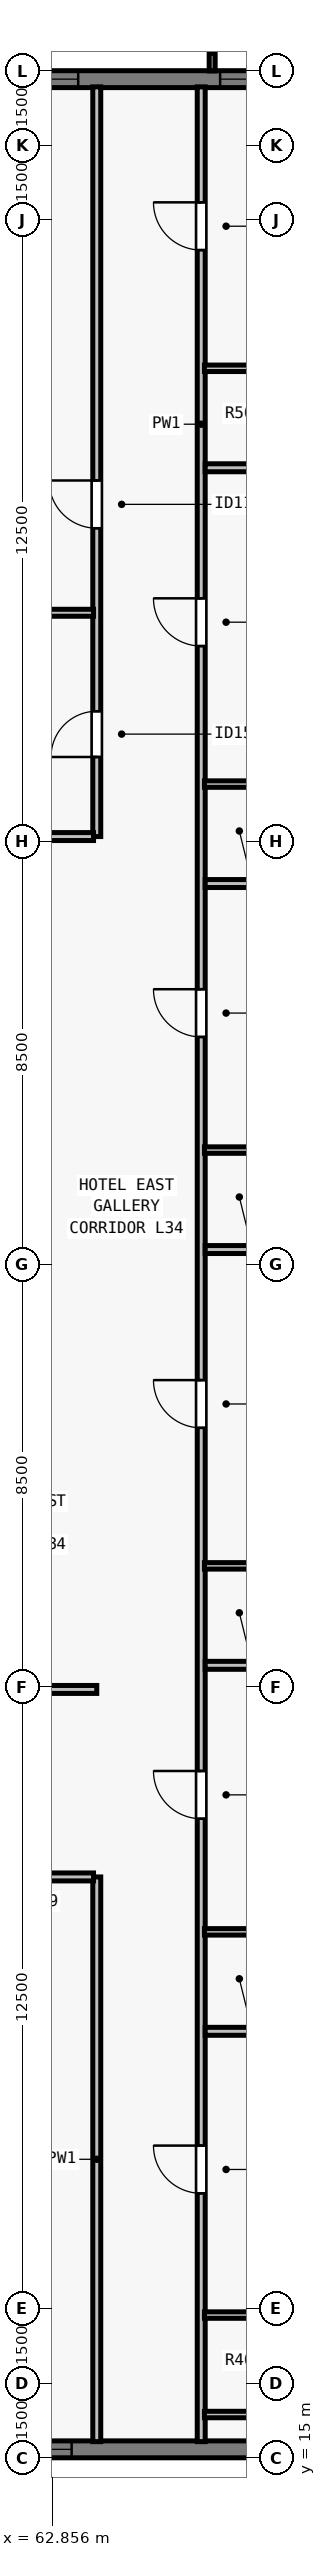
"""IFC4 building model, lengths in metres.
Left out: names, types, materials, properties, quantities, classifications, styles, units other than length and angle.
Written with IfcOpenShell. Run it as: python <this file> out.ifc"""

import sys

from ifc_helpers import new_model, si_unit, direction, frame, frame_2d, origin, place, context, subcontext, project, spatial, rectangle, extrude, element, fill, save


model = new_model("IFC4")
c1 = context("Model", 3, precision=1e-05, world=origin(), true_north=direction((0.0, 1.0)))
c2 = subcontext(c1, "Body", "Model", "MODEL_VIEW")
j1 = project(units=[si_unit("LENGTHUNIT", "METRE"), si_unit("PLANEANGLEUNIT", "RADIAN")], contexts=[c1])
p1 = place(None, origin())
s1 = spatial("IfcSite", under=j1, at=p1, CompositionType="ELEMENT")
p2 = place(p1, origin())
s2 = spatial("IfcBuilding", under=s1, at=p2, CompositionType="ELEMENT")
p3 = place(p2, frame((0.0, 0.0, 127.0)))
s3 = spatial("IfcBuildingStorey", under=s2, at=p3, CompositionType="ELEMENT", Elevation=127.0)
p4 = place(p3, frame((32.0, 62.83, 0.0), z_axis=(0.0, 0.0, 1.0), x_axis=(1.0, 0.0, 0.0)))
e1 = element("IfcWall", 1, at=p4, inside=s3, PredefinedType="SOLIDWALL", context=c2, shape_type="SweptSolid", body=[
    extrude(rectangle(XDim=39.682, YDim=0.34, at=frame_2d((19.841, 0.0))), origin(), (0.0, 0.0, 1.0), 3.28),
])
p5 = place(p4, frame((4.952, 0.0, 0.8)))
e2 = element("IfcOpeningElement", 2, at=p5, cuts=e1, PredefinedType="OPENING", context=c2, shape_type="SweptSolid", body=[
    extrude(rectangle(XDim=1.35, YDim=1.66, at=frame_2d((0.675, 0.83))), frame((0.0, 0.18, 0.0), z_axis=(0.0, -1.0, 0.0), x_axis=(1.0, 0.0, 0.0)), (0.0, 0.0, 1.0), 0.36),
])
p6 = place(p4, frame((12.059, 0.0, 0.8)))
e3 = element("IfcOpeningElement", 3, at=p6, cuts=e1, PredefinedType="OPENING", context=c2, shape_type="SweptSolid", body=[
    extrude(rectangle(XDim=1.35, YDim=1.66, at=frame_2d((0.675, 0.83))), frame((0.0, 0.18, 0.0), z_axis=(0.0, -1.0, 0.0), x_axis=(1.0, 0.0, 0.0)), (0.0, 0.0, 1.0), 0.36),
])
p7 = place(p4, frame((16.262, 0.0, 0.8)))
e4 = element("IfcOpeningElement", 4, at=p7, cuts=e1, PredefinedType="OPENING", context=c2, shape_type="SweptSolid", body=[
    extrude(rectangle(XDim=1.75, YDim=1.66, at=frame_2d((0.875, 0.83))), frame((0.0, 0.18, 0.0), z_axis=(0.0, -1.0, 0.0), x_axis=(1.0, 0.0, 0.0)), (0.0, 0.0, 1.0), 0.36),
])
p8 = place(p4, frame((19.166, 0.0, 0.8)))
e5 = element("IfcOpeningElement", 5, at=p8, cuts=e1, PredefinedType="OPENING", context=c2, shape_type="SweptSolid", body=[
    extrude(rectangle(XDim=1.35, YDim=1.66, at=frame_2d((0.675, 0.83))), frame((0.0, 0.18, 0.0), z_axis=(0.0, -1.0, 0.0), x_axis=(1.0, 0.0, 0.0)), (0.0, 0.0, 1.0), 0.36),
])
p9 = place(p4, frame((22.07, 0.0, 0.8)))
e6 = element("IfcOpeningElement", 6, at=p9, cuts=e1, PredefinedType="OPENING", context=c2, shape_type="SweptSolid", body=[
    extrude(rectangle(XDim=1.75, YDim=1.66, at=frame_2d((0.875, 0.83))), frame((0.0, 0.18, 0.0), z_axis=(0.0, -1.0, 0.0), x_axis=(1.0, 0.0, 0.0)), (0.0, 0.0, 1.0), 0.36),
])
p10 = place(p4, frame((26.273, 0.0, 0.8)))
e7 = element("IfcOpeningElement", 7, at=p10, cuts=e1, PredefinedType="OPENING", context=c2, shape_type="SweptSolid", body=[
    extrude(rectangle(XDim=1.35, YDim=1.66, at=frame_2d((0.675, 0.83))), frame((0.0, 0.18, 0.0), z_axis=(0.0, -1.0, 0.0), x_axis=(1.0, 0.0, 0.0)), (0.0, 0.0, 1.0), 0.36),
])
p11 = place(p4, frame((29.627, 0.0, 0.8)))
e8 = element("IfcOpeningElement", 8, at=p11, cuts=e1, PredefinedType="OPENING", context=c2, shape_type="SweptSolid", body=[
    extrude(rectangle(XDim=1.75, YDim=1.66, at=frame_2d((0.875, 0.83))), frame((0.0, 0.18, 0.0), z_axis=(0.0, -1.0, 0.0), x_axis=(1.0, 0.0, 0.0)), (0.0, 0.0, 1.0), 0.36),
])
p12 = place(p4, frame((34.23, 0.0, 0.8)))
e9 = element("IfcOpeningElement", 9, at=p12, cuts=e1, PredefinedType="OPENING", context=c2, shape_type="SweptSolid", body=[
    extrude(rectangle(XDim=1.35, YDim=1.66, at=frame_2d((0.675, 0.83))), frame((0.0, 0.18, 0.0), z_axis=(0.0, -1.0, 0.0), x_axis=(1.0, 0.0, 0.0)), (0.0, 0.0, 1.0), 0.36),
])
p13 = place(p3, frame((72.0, 15.17, 0.0), z_axis=(0.0, 0.0, 1.0), x_axis=(-1.0, 0.0, 0.0)))
e10 = element("IfcWall", 10, at=p13, inside=s3, PredefinedType="SOLIDWALL", context=c2, shape_type="SweptSolid", body=[
    extrude(rectangle(XDim=39.682, YDim=0.34, at=frame_2d((19.841, 0.0))), origin(), (0.0, 0.0, 1.0), 3.28),
])
p14 = place(p13, frame((8.755, 0.0, 0.8)))
e11 = element("IfcOpeningElement", 11, at=p14, cuts=e10, PredefinedType="OPENING", context=c2, shape_type="SweptSolid", body=[
    extrude(rectangle(XDim=1.75, YDim=1.66, at=frame_2d((0.875, 0.83))), frame((0.0, 0.18, 0.0), z_axis=(0.0, -1.0, 0.0), x_axis=(1.0, 0.0, 0.0)), (0.0, 0.0, 1.0), 0.36),
])
p15 = place(p13, frame((12.059, 0.0, 0.8)))
e12 = element("IfcOpeningElement", 12, at=p15, cuts=e10, PredefinedType="OPENING", context=c2, shape_type="SweptSolid", body=[
    extrude(rectangle(XDim=1.35, YDim=1.66, at=frame_2d((0.675, 0.83))), frame((0.0, 0.18, 0.0), z_axis=(0.0, -1.0, 0.0), x_axis=(1.0, 0.0, 0.0)), (0.0, 0.0, 1.0), 0.36),
])
p16 = place(p13, frame((16.262, 0.0, 0.8)))
e13 = element("IfcOpeningElement", 13, at=p16, cuts=e10, PredefinedType="OPENING", context=c2, shape_type="SweptSolid", body=[
    extrude(rectangle(XDim=1.75, YDim=1.66, at=frame_2d((0.875, 0.83))), frame((0.0, 0.18, 0.0), z_axis=(0.0, -1.0, 0.0), x_axis=(1.0, 0.0, 0.0)), (0.0, 0.0, 1.0), 0.36),
])
p17 = place(p13, frame((19.166, 0.0, 0.8)))
e14 = element("IfcOpeningElement", 14, at=p17, cuts=e10, PredefinedType="OPENING", context=c2, shape_type="SweptSolid", body=[
    extrude(rectangle(XDim=1.35, YDim=1.66, at=frame_2d((0.675, 0.83))), frame((0.0, 0.18, 0.0), z_axis=(0.0, -1.0, 0.0), x_axis=(1.0, 0.0, 0.0)), (0.0, 0.0, 1.0), 0.36),
])
p18 = place(p13, frame((21.27, 0.0, 0.8)))
e15 = element("IfcOpeningElement", 15, at=p18, cuts=e10, PredefinedType="OPENING", context=c2, shape_type="SweptSolid", body=[
    extrude(rectangle(XDim=1.75, YDim=1.66, at=frame_2d((0.875, 0.83))), frame((0.0, 0.18, 0.0), z_axis=(0.0, -1.0, 0.0), x_axis=(1.0, 0.0, 0.0)), (0.0, 0.0, 1.0), 0.36),
])
p19 = place(p13, frame((26.273, 0.0, 0.8)))
e16 = element("IfcOpeningElement", 16, at=p19, cuts=e10, PredefinedType="OPENING", context=c2, shape_type="SweptSolid", body=[
    extrude(rectangle(XDim=1.35, YDim=1.66, at=frame_2d((0.675, 0.83))), frame((0.0, 0.18, 0.0), z_axis=(0.0, -1.0, 0.0), x_axis=(1.0, 0.0, 0.0)), (0.0, 0.0, 1.0), 0.36),
])
p20 = place(p13, frame((28.377, 0.0, 0.8)))
e17 = element("IfcOpeningElement", 17, at=p20, cuts=e10, PredefinedType="OPENING", context=c2, shape_type="SweptSolid", body=[
    extrude(rectangle(XDim=1.75, YDim=1.66, at=frame_2d((0.875, 0.83))), frame((0.0, 0.18, 0.0), z_axis=(0.0, -1.0, 0.0), x_axis=(1.0, 0.0, 0.0)), (0.0, 0.0, 1.0), 0.36),
])
p21 = place(p13, frame((32.93, 0.0, 0.8)))
e18 = element("IfcOpeningElement", 18, at=p21, cuts=e10, PredefinedType="OPENING", context=c2, shape_type="SweptSolid", body=[
    extrude(rectangle(XDim=1.35, YDim=1.66, at=frame_2d((0.675, 0.83))), frame((0.0, 0.18, 0.0), z_axis=(0.0, -1.0, 0.0), x_axis=(1.0, 0.0, 0.0)), (0.0, 0.0, 1.0), 0.36),
])
p22 = place(p3, frame((65.85, 15.325, 0.0), z_axis=(0.0, 0.0, 1.0), x_axis=(0.0, 1.0, 0.0)))
e19 = element("IfcWall", 19, at=p22, inside=s3, PredefinedType="PARTITIONING", context=c2, shape_type="SweptSolid", body=[
    extrude(rectangle(XDim=47.35, YDim=0.16, at=frame_2d((23.675, 0.0))), origin(), (0.0, 0.0, 1.0), 2.555),
])
p23 = place(p22, frame((4.993, 0.0, 0.0)))
e20 = element("IfcOpeningElement", 20, at=p23, cuts=e19, PredefinedType="OPENING", context=c2, shape_type="SweptSolid", body=[
    extrude(rectangle(XDim=0.96, YDim=2.15, at=frame_2d((0.48, 1.075))), frame((0.0, 0.09, 0.0), z_axis=(0.0, -1.0, 0.0), x_axis=(1.0, 0.0, 0.0)), (0.0, 0.0, 1.0), 0.18),
])
p24 = place(p22, frame((12.525, 0.0, 0.0)))
e21 = element("IfcOpeningElement", 21, at=p24, cuts=e19, PredefinedType="OPENING", context=c2, shape_type="SweptSolid", body=[
    extrude(rectangle(XDim=0.96, YDim=2.15, at=frame_2d((0.48, 1.075))), frame((0.0, 0.09, 0.0), z_axis=(0.0, -1.0, 0.0), x_axis=(1.0, 0.0, 0.0)), (0.0, 0.0, 1.0), 0.18),
])
p25 = place(p22, frame((20.385, 0.0, 0.0)))
e22 = element("IfcOpeningElement", 22, at=p25, cuts=e19, PredefinedType="OPENING", context=c2, shape_type="SweptSolid", body=[
    extrude(rectangle(XDim=0.96, YDim=2.15, at=frame_2d((0.48, 1.075))), frame((0.0, 0.09, 0.0), z_axis=(0.0, -1.0, 0.0), x_axis=(1.0, 0.0, 0.0)), (0.0, 0.0, 1.0), 0.18),
])
p26 = place(p22, frame((28.246, 0.0, 0.0)))
e23 = element("IfcOpeningElement", 23, at=p26, cuts=e19, PredefinedType="OPENING", context=c2, shape_type="SweptSolid", body=[
    extrude(rectangle(XDim=0.96, YDim=2.15, at=frame_2d((0.48, 1.075))), frame((0.0, 0.09, 0.0), z_axis=(0.0, -1.0, 0.0), x_axis=(1.0, 0.0, 0.0)), (0.0, 0.0, 1.0), 0.18),
])
p27 = place(p22, frame((36.105, 0.0, 0.0)))
e24 = element("IfcOpeningElement", 24, at=p27, cuts=e19, PredefinedType="OPENING", context=c2, shape_type="SweptSolid", body=[
    extrude(rectangle(XDim=0.96, YDim=2.15, at=frame_2d((0.48, 1.075))), frame((0.0, 0.09, 0.0), z_axis=(0.0, -1.0, 0.0), x_axis=(1.0, 0.0, 0.0)), (0.0, 0.0, 1.0), 0.18),
])
p28 = place(p22, frame((44.068, 0.0, 0.0)))
e25 = element("IfcOpeningElement", 25, at=p28, cuts=e19, PredefinedType="OPENING", context=c2, shape_type="SweptSolid", body=[
    extrude(rectangle(XDim=0.96, YDim=2.15, at=frame_2d((0.48, 1.075))), frame((0.0, 0.09, 0.0), z_axis=(0.0, -1.0, 0.0), x_axis=(1.0, 0.0, 0.0)), (0.0, 0.0, 1.0), 0.18),
])
p29 = place(p3, frame((63.75, 15.325, 0.0), z_axis=(0.0, 0.0, 1.0), x_axis=(0.0, 1.0, 0.0)))
e26 = element("IfcWall", 26, at=p29, inside=s3, PredefinedType="PARTITIONING", context=c2, shape_type="SweptSolid", body=[
    extrude(rectangle(XDim=11.355, YDim=0.16, at=frame_2d((5.677, 0.0))), origin(), (0.0, 0.0, 1.0), 2.555),
])
p30 = place(p3, frame((63.75, 47.6, 0.0), z_axis=(0.0, 0.0, 1.0), x_axis=(0.0, 1.0, 0.0)))
e27 = element("IfcWall", 27, at=p30, inside=s3, PredefinedType="PARTITIONING", context=c2, shape_type="SweptSolid", body=[
    extrude(rectangle(XDim=15.075, YDim=0.16, at=frame_2d((7.538, 0.0))), origin(), (0.0, 0.0, 1.0), 2.555),
])
p31 = place(p30, frame((1.6, 0.0, 0.0)))
e28 = element("IfcOpeningElement", 28, at=p31, cuts=e27, PredefinedType="OPENING", context=c2, shape_type="SweptSolid", body=[
    extrude(rectangle(XDim=0.92, YDim=2.12, at=frame_2d((0.46, 1.06))), frame((0.0, 0.09, 0.0), z_axis=(0.0, -1.0, 0.0), x_axis=(1.0, 0.0, 0.0)), (0.0, 0.0, 1.0), 0.18),
])
p32 = place(p30, frame((6.2, 0.0, 0.0)))
e29 = element("IfcOpeningElement", 29, at=p32, cuts=e27, PredefinedType="OPENING", context=c2, shape_type="SweptSolid", body=[
    extrude(rectangle(XDim=0.96, YDim=2.12, at=frame_2d((0.48, 1.06))), frame((0.0, 0.09, 0.0), z_axis=(0.0, -1.0, 0.0), x_axis=(1.0, 0.0, 0.0)), (0.0, 0.0, 1.0), 0.18),
])
p33 = place(p3, frame((60.765, 30.45, 0.0), z_axis=(0.0, 0.0, 1.0), x_axis=(1.0, 0.0, 0.0)))
e30 = element("IfcWall", 30, at=p33, inside=s3, PredefinedType="PARTITIONING", context=c2, shape_type="SweptSolid", body=[
    extrude(rectangle(XDim=2.985, YDim=0.16, at=frame_2d((1.493, 0.0))), origin(), (0.0, 0.0, 1.0), 3.28),
])
p34 = place(p3, frame((60.765, 47.6, 0.0), z_axis=(0.0, 0.0, 1.0), x_axis=(1.0, 0.0, 0.0)))
e31 = element("IfcWall", 31, at=p34, inside=s3, PredefinedType="PARTITIONING", context=c2, shape_type="SweptSolid", body=[
    extrude(rectangle(XDim=2.92, YDim=0.16, at=frame_2d((1.46, 0.0))), origin(), (0.0, 0.0, 1.0), 3.28),
])
p35 = place(p3, frame((41.615, 26.68, 0.0), z_axis=(0.0, 0.0, 1.0), x_axis=(1.0, 0.0, 0.0)))
e32 = element("IfcWall", 32, at=p35, inside=s3, PredefinedType="PARTITIONING", context=c2, shape_type="SweptSolid", body=[
    extrude(rectangle(XDim=22.07, YDim=0.16, at=frame_2d((11.035, 0.0))), origin(), (0.0, 0.0, 1.0), 3.28),
])
p36 = place(p35, frame((4.281, 0.0, 0.0)))
e33 = element("IfcOpeningElement", 33, at=p36, cuts=e32, PredefinedType="OPENING", context=c2, shape_type="SweptSolid", body=[
    extrude(rectangle(XDim=0.96, YDim=2.15, at=frame_2d((0.48, 1.075))), frame((0.0, 0.09, 0.0), z_axis=(0.0, -1.0, 0.0), x_axis=(1.0, 0.0, 0.0)), (0.0, 0.0, 1.0), 0.18),
])
p37 = place(p35, frame((11.56, 0.0, 0.0)))
e34 = element("IfcOpeningElement", 34, at=p37, cuts=e32, PredefinedType="OPENING", context=c2, shape_type="SweptSolid", body=[
    extrude(rectangle(XDim=0.96, YDim=2.15, at=frame_2d((0.48, 1.075))), frame((0.0, 0.09, 0.0), z_axis=(0.0, -1.0, 0.0), x_axis=(1.0, 0.0, 0.0)), (0.0, 0.0, 1.0), 0.18),
])
p38 = place(p35, frame((19.134, 0.0, 0.0)))
e35 = element("IfcOpeningElement", 35, at=p38, cuts=e32, PredefinedType="OPENING", context=c2, shape_type="SweptSolid", body=[
    extrude(rectangle(XDim=0.96, YDim=2.15, at=frame_2d((0.48, 1.075))), frame((0.0, 0.09, 0.0), z_axis=(0.0, -1.0, 0.0), x_axis=(1.0, 0.0, 0.0)), (0.0, 0.0, 1.0), 0.18),
])
p39 = place(p3, frame((53.555, 52.1, 0.0), z_axis=(0.0, 0.0, 1.0), x_axis=(1.0, 0.0, 0.0)))
e36 = element("IfcWall", 36, at=p39, inside=s3, PredefinedType="PARTITIONING", context=c2, shape_type="SweptSolid", body=[
    extrude(rectangle(XDim=10.13, YDim=0.14, at=frame_2d((5.065, 0.0))), origin(), (0.0, 0.0, 1.0), 3.28),
])
for number, where, z_axis, x_axis in (
    (37, (65.915, 15.87, 0.0), (0.0, 0.0, 1.0), (1.0, 0.0, 0.0)),
    (38, (65.915, 17.87, 0.0), (0.0, 0.0, 1.0), (1.0, 0.0, 0.0)),
):
    element("IfcWall", number, at=place(p3, frame(where, z_axis=z_axis, x_axis=x_axis)), inside=s3, PredefinedType="PLUMBINGWALL", context=c2, shape_type="SweptSolid", body=[
        extrude(rectangle(XDim=2.315, YDim=0.13, at=frame_2d((1.157, 0.0))), origin(), (0.0, 0.0, 1.0), 3.28),
    ])
p40 = place(p3, frame((65.93, 23.576, 0.0), z_axis=(0.0, 0.0, 1.0), x_axis=(1.0, 0.0, 0.0)))
e39 = element("IfcWall", 39, at=p40, inside=s3, PredefinedType="PARTITIONING", context=c2, shape_type="SweptSolid", body=[
    extrude(rectangle(XDim=9.745, YDim=0.16, at=frame_2d((4.873, 0.0))), origin(), (0.0, 0.0, 1.0), 2.896),
])
p41 = place(p3, frame((65.915, 25.576, 0.0), z_axis=(0.0, 0.0, 1.0), x_axis=(1.0, 0.0, 0.0)))
e40 = element("IfcWall", 40, at=p41, inside=s3, PredefinedType="PLUMBINGWALL", context=c2, shape_type="SweptSolid", body=[
    extrude(rectangle(XDim=2.315, YDim=0.13, at=frame_2d((1.157, 0.0))), origin(), (0.0, 0.0, 1.0), 2.896),
])
p42 = place(p3, frame((65.93, 30.935, 0.0), z_axis=(0.0, 0.0, 1.0), x_axis=(1.0, 0.0, 0.0)))
e41 = element("IfcWall", 41, at=p42, inside=s3, PredefinedType="PARTITIONING", context=c2, shape_type="SweptSolid", body=[
    extrude(rectangle(XDim=9.745, YDim=0.16, at=frame_2d((4.873, 0.0))), origin(), (0.0, 0.0, 1.0), 3.28),
])
p43 = place(p3, frame((65.915, 32.935, 0.0), z_axis=(0.0, 0.0, 1.0), x_axis=(1.0, 0.0, 0.0)))
e42 = element("IfcWall", 42, at=p43, inside=s3, PredefinedType="PLUMBINGWALL", context=c2, shape_type="SweptSolid", body=[
    extrude(rectangle(XDim=2.315, YDim=0.13, at=frame_2d((1.157, 0.0))), origin(), (0.0, 0.0, 1.0), 3.28),
])
p44 = place(p3, frame((65.93, 39.296, 0.0), z_axis=(0.0, 0.0, 1.0), x_axis=(1.0, 0.0, 0.0)))
e43 = element("IfcWall", 43, at=p44, inside=s3, PredefinedType="PARTITIONING", context=c2, shape_type="SweptSolid", body=[
    extrude(rectangle(XDim=9.745, YDim=0.16, at=frame_2d((4.873, 0.0))), origin(), (0.0, 0.0, 1.0), 3.28),
])
p45 = place(p3, frame((65.915, 41.296, 0.0), z_axis=(0.0, 0.0, 1.0), x_axis=(1.0, 0.0, 0.0)))
e44 = element("IfcWall", 44, at=p45, inside=s3, PredefinedType="PLUMBINGWALL", context=c2, shape_type="SweptSolid", body=[
    extrude(rectangle(XDim=2.315, YDim=0.13, at=frame_2d((1.157, 0.0))), origin(), (0.0, 0.0, 1.0), 3.28),
])
p46 = place(p3, frame((65.93, 46.655, 0.0), z_axis=(0.0, 0.0, 1.0), x_axis=(1.0, 0.0, 0.0)))
e45 = element("IfcWall", 45, at=p46, inside=s3, PredefinedType="PARTITIONING", context=c2, shape_type="SweptSolid", body=[
    extrude(rectangle(XDim=9.745, YDim=0.16, at=frame_2d((4.873, 0.0))), origin(), (0.0, 0.0, 1.0), 3.28),
])
p47 = place(p3, frame((65.915, 48.655, 0.0), z_axis=(0.0, 0.0, 1.0), x_axis=(1.0, 0.0, 0.0)))
e46 = element("IfcWall", 46, at=p47, inside=s3, PredefinedType="PLUMBINGWALL", context=c2, shape_type="SweptSolid", body=[
    extrude(rectangle(XDim=2.315, YDim=0.13, at=frame_2d((1.157, 0.0))), origin(), (0.0, 0.0, 1.0), 3.28),
])
p48 = place(p3, frame((65.93, 55.016, 0.0), z_axis=(0.0, 0.0, 1.0), x_axis=(1.0, 0.0, 0.0)))
e47 = element("IfcWall", 47, at=p48, inside=s3, PredefinedType="PARTITIONING", context=c2, shape_type="SweptSolid", body=[
    extrude(rectangle(XDim=9.745, YDim=0.16, at=frame_2d((4.873, 0.0))), origin(), (0.0, 0.0, 1.0), 2.896),
])
p49 = place(p3, frame((65.915, 57.016, 0.0), z_axis=(0.0, 0.0, 1.0), x_axis=(1.0, 0.0, 0.0)))
e48 = element("IfcWall", 48, at=p49, inside=s3, PredefinedType="PLUMBINGWALL", context=c2, shape_type="SweptSolid", body=[
    extrude(rectangle(XDim=2.315, YDim=0.13, at=frame_2d((1.157, 0.0))), origin(), (0.0, 0.0, 1.0), 3.28),
])
p50 = place(p11, origin())
e49 = element("IfcWindow", 49, at=p50, inside=s3, PartitioningType="SINGLE_PANEL", PredefinedType="WINDOW", context=c2, shape_type="SweptSolid", body=[
    extrude(rectangle(XDim=1.75, YDim=1.66, at=frame_2d((0.875, 0.83))), frame((0.0, -0.05, 0.0), z_axis=(0.0, -1.0, 0.0), x_axis=(1.0, 0.0, 0.0)), (0.0, 0.0, 1.0), 0.06),
])
fill(e8, e49)
p51 = place(p12, origin())
e50 = element("IfcWindow", 50, at=p51, inside=s3, PartitioningType="SINGLE_PANEL", PredefinedType="WINDOW", context=c2, shape_type="SweptSolid", body=[
    extrude(rectangle(XDim=1.35, YDim=1.66, at=frame_2d((0.675, 0.83))), frame((0.0, -0.05, 0.0), z_axis=(0.0, -1.0, 0.0), x_axis=(1.0, 0.0, 0.0)), (0.0, 0.0, 1.0), 0.06),
])
fill(e9, e50)
p52 = place(p14, origin())
e51 = element("IfcWindow", 51, at=p52, inside=s3, PartitioningType="SINGLE_PANEL", PredefinedType="WINDOW", context=c2, shape_type="SweptSolid", body=[
    extrude(rectangle(XDim=1.75, YDim=1.66, at=frame_2d((0.875, 0.83))), frame((0.0, -0.05, 0.0), z_axis=(0.0, -1.0, 0.0), x_axis=(1.0, 0.0, 0.0)), (0.0, 0.0, 1.0), 0.06),
])
fill(e11, e51)
p53 = place(p31, origin())
e52 = element("IfcDoor", 52, at=p53, inside=s3, OperationType="SINGLE_SWING_LEFT", PredefinedType="DOOR", context=c2, shape_type="SweptSolid", body=[
    extrude(rectangle(XDim=0.92, YDim=2.12, at=frame_2d((0.46, 1.06))), frame((0.0, 0.025, 0.0), z_axis=(0.0, -1.0, 0.0), x_axis=(1.0, 0.0, 0.0)), (0.0, 0.0, 1.0), 0.05),
])
fill(e28, e52)
p54 = place(p32, origin())
e53 = element("IfcDoor", 53, at=p54, inside=s3, OperationType="SINGLE_SWING_RIGHT", PredefinedType="DOOR", context=c2, shape_type="SweptSolid", body=[
    extrude(rectangle(XDim=0.96, YDim=2.12, at=frame_2d((0.48, 1.06))), frame((0.0, 0.025, 0.0), z_axis=(0.0, -1.0, 0.0), x_axis=(1.0, 0.0, 0.0)), (0.0, 0.0, 1.0), 0.05),
])
fill(e29, e53)
p55 = place(p23, origin())
e54 = element("IfcDoor", 54, at=p55, inside=s3, OperationType="SINGLE_SWING_RIGHT", PredefinedType="DOOR", context=c2, shape_type="SweptSolid", body=[
    extrude(rectangle(XDim=0.96, YDim=2.15, at=frame_2d((0.48, 1.075))), frame((0.0, 0.025, 0.0), z_axis=(0.0, -1.0, 0.0), x_axis=(1.0, 0.0, 0.0)), (0.0, 0.0, 1.0), 0.05),
])
fill(e20, e54)
p56 = place(p24, origin())
e55 = element("IfcDoor", 55, at=p56, inside=s3, OperationType="SINGLE_SWING_RIGHT", PredefinedType="DOOR", context=c2, shape_type="SweptSolid", body=[
    extrude(rectangle(XDim=0.96, YDim=2.15, at=frame_2d((0.48, 1.075))), frame((0.0, 0.025, 0.0), z_axis=(0.0, -1.0, 0.0), x_axis=(1.0, 0.0, 0.0)), (0.0, 0.0, 1.0), 0.05),
])
fill(e21, e55)
p57 = place(p25, origin())
e56 = element("IfcDoor", 56, at=p57, inside=s3, OperationType="SINGLE_SWING_RIGHT", PredefinedType="DOOR", context=c2, shape_type="SweptSolid", body=[
    extrude(rectangle(XDim=0.96, YDim=2.15, at=frame_2d((0.48, 1.075))), frame((0.0, 0.025, 0.0), z_axis=(0.0, -1.0, 0.0), x_axis=(1.0, 0.0, 0.0)), (0.0, 0.0, 1.0), 0.05),
])
fill(e22, e56)
p58 = place(p26, origin())
e57 = element("IfcDoor", 57, at=p58, inside=s3, OperationType="SINGLE_SWING_RIGHT", PredefinedType="DOOR", context=c2, shape_type="SweptSolid", body=[
    extrude(rectangle(XDim=0.96, YDim=2.15, at=frame_2d((0.48, 1.075))), frame((0.0, 0.025, 0.0), z_axis=(0.0, -1.0, 0.0), x_axis=(1.0, 0.0, 0.0)), (0.0, 0.0, 1.0), 0.05),
])
fill(e23, e57)
p59 = place(p27, origin())
e58 = element("IfcDoor", 58, at=p59, inside=s3, OperationType="SINGLE_SWING_RIGHT", PredefinedType="DOOR", context=c2, shape_type="SweptSolid", body=[
    extrude(rectangle(XDim=0.96, YDim=2.15, at=frame_2d((0.48, 1.075))), frame((0.0, 0.025, 0.0), z_axis=(0.0, -1.0, 0.0), x_axis=(1.0, 0.0, 0.0)), (0.0, 0.0, 1.0), 0.05),
])
fill(e24, e58)
p60 = place(p28, origin())
e59 = element("IfcDoor", 59, at=p60, inside=s3, OperationType="SINGLE_SWING_RIGHT", PredefinedType="DOOR", context=c2, shape_type="SweptSolid", body=[
    extrude(rectangle(XDim=0.96, YDim=2.15, at=frame_2d((0.48, 1.075))), frame((0.0, 0.025, 0.0), z_axis=(0.0, -1.0, 0.0), x_axis=(1.0, 0.0, 0.0)), (0.0, 0.0, 1.0), 0.05),
])
fill(e25, e59)
save(model, sys.argv[1])
